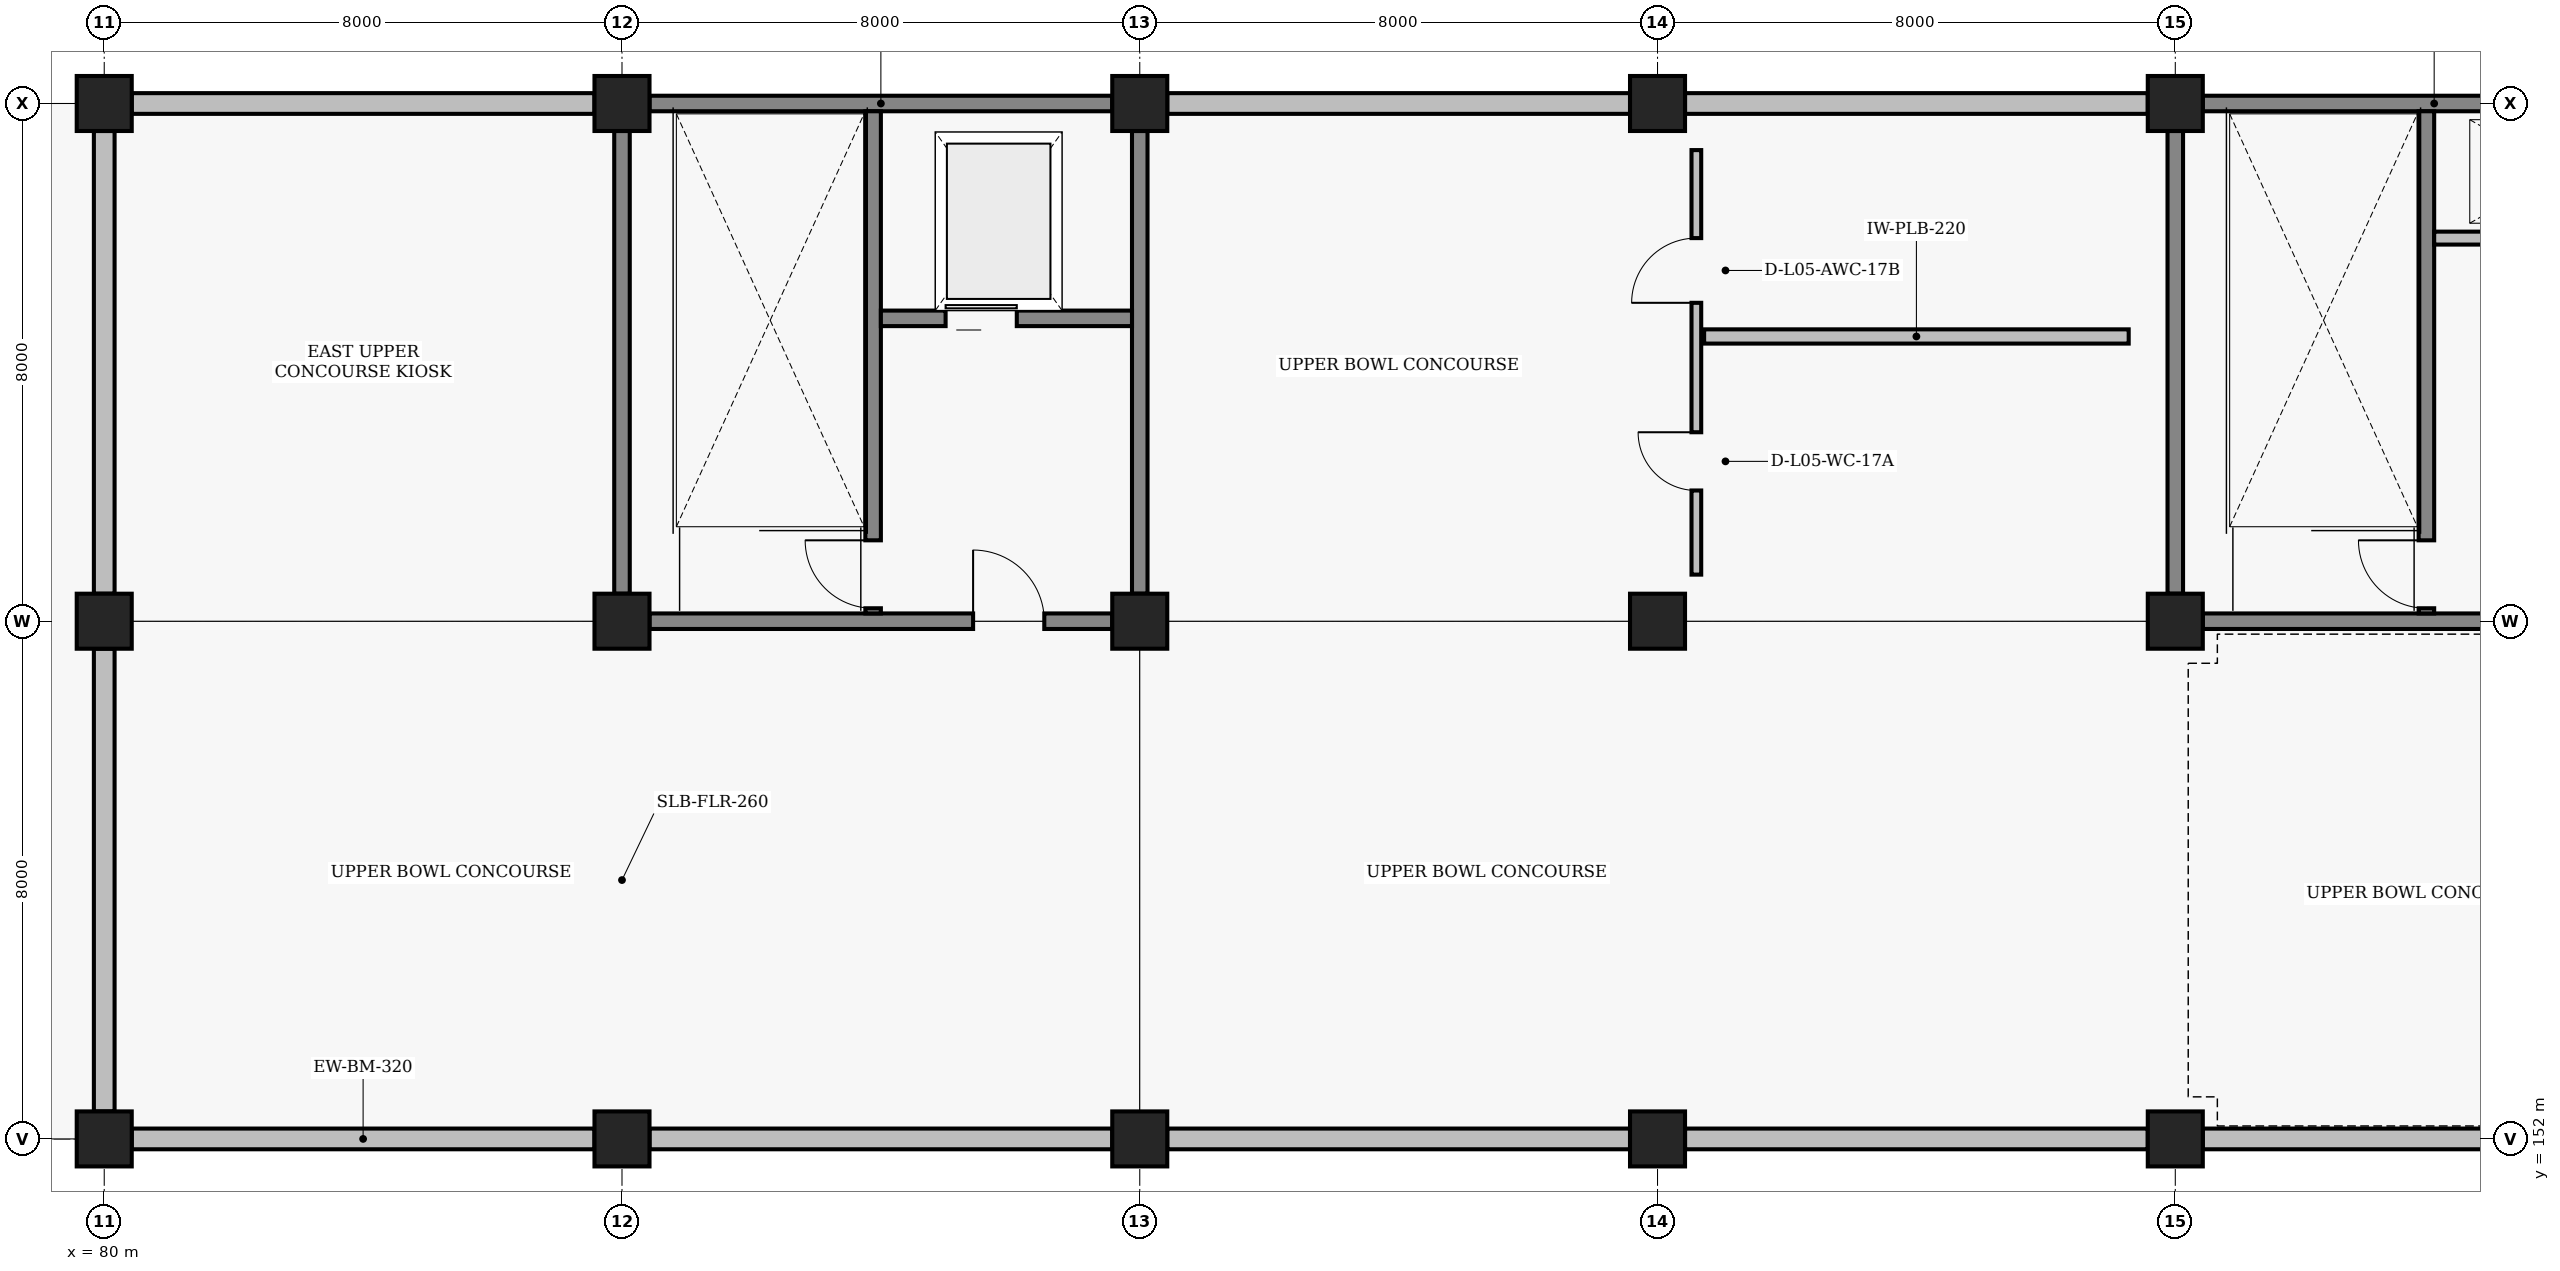
"""IFC4 building model, lengths in metres.
Left out: names, types, materials, properties, quantities, classifications, styles, units other than length and angle.
Written with IfcOpenShell. Run it as: python <this file> out.ifc"""

import sys

from ifc_helpers import new_model, si_unit, direction, frame, frame_2d, origin, origin_2d, place, context, subcontext, project, spatial, rectangle, extrude, element, fill, save


model = new_model("IFC4")
c1 = context("Model", 3, precision=1e-05, world=origin(), true_north=direction((0.0, 1.0)))
c2 = subcontext(c1, "Body", "Model", "MODEL_VIEW")
j1 = project(units=[si_unit("LENGTHUNIT", "METRE"), si_unit("PLANEANGLEUNIT", "RADIAN")], contexts=[c1])
p1 = place(None, origin())
s1 = spatial("IfcSite", under=j1, at=p1, CompositionType="ELEMENT")
p2 = place(p1, origin())
s2 = spatial("IfcBuilding", under=s1, at=p2, CompositionType="ELEMENT")
p3 = place(p2, frame((0.0, 0.0, 18.6)))
s3 = spatial("IfcBuildingStorey", under=s2, at=p3, CompositionType="ELEMENT", Elevation=18.6)
for number, where, z_axis, x_axis in (
    (1, (80.0, 152.0, 0.0), (0.0, 0.0, 1.0), (1.0, 0.0, 0.0)),
    (2, (80.0, 160.0, 0.0), (0.0, 0.0, 1.0), (1.0, 0.0, 0.0)),
    (3, (80.0, 168.0, 0.0), (0.0, 0.0, 1.0), (1.0, 0.0, 0.0)),
    (4, (88.0, 152.0, 0.0), (0.0, 0.0, 1.0), (1.0, 0.0, 0.0)),
    (5, (88.0, 160.0, 0.0), (0.0, 0.0, 1.0), (1.0, 0.0, 0.0)),
    (6, (88.0, 168.0, 0.0), (0.0, 0.0, 1.0), (1.0, 0.0, 0.0)),
    (7, (96.0, 152.0, 0.0), (0.0, 0.0, 1.0), (1.0, 0.0, 0.0)),
    (8, (96.0, 160.0, 0.0), (0.0, 0.0, 1.0), (1.0, 0.0, 0.0)),
    (9, (96.0, 168.0, 0.0), (0.0, 0.0, 1.0), (1.0, 0.0, 0.0)),
    (10, (104.0, 152.0, 0.0), (0.0, 0.0, 1.0), (1.0, 0.0, 0.0)),
    (11, (104.0, 160.0, 0.0), (0.0, 0.0, 1.0), (1.0, 0.0, 0.0)),
    (12, (104.0, 168.0, 0.0), (0.0, 0.0, 1.0), (1.0, 0.0, 0.0)),
    (13, (112.0, 152.0, 0.0), (0.0, 0.0, 1.0), (1.0, 0.0, 0.0)),
    (14, (112.0, 160.0, 0.0), (0.0, 0.0, 1.0), (1.0, 0.0, 0.0)),
    (15, (112.0, 168.0, 0.0), (0.0, 0.0, 1.0), (1.0, 0.0, 0.0)),
):
    element("IfcColumn", number, at=place(p3, frame(where, z_axis=z_axis, x_axis=x_axis)), inside=s3, PredefinedType="COLUMN", context=c2, shape_type="SweptSolid", body=[
        extrude(rectangle(XDim=0.85, YDim=0.85, at=origin_2d()), origin(), (0.0, 0.0, 1.0), 4.2),
    ])
for number, where, z_axis, x_axis in (
    (16, (80.425, 152.0, 0.0), (0.0, 0.0, 1.0), (1.0, 0.0, 0.0)),
    (17, (80.0, 152.425, 0.0), (0.0, 0.0, 1.0), (0.0, 1.0, 0.0)),
    (18, (80.425, 168.0, 0.0), (0.0, 0.0, 1.0), (1.0, 0.0, 0.0)),
    (19, (80.0, 160.425, 0.0), (0.0, 0.0, 1.0), (0.0, 1.0, 0.0)),
    (20, (88.425, 152.0, 0.0), (0.0, 0.0, 1.0), (1.0, 0.0, 0.0)),
    (21, (96.425, 152.0, 0.0), (0.0, 0.0, 1.0), (1.0, 0.0, 0.0)),
    (22, (96.425, 168.0, 0.0), (0.0, 0.0, 1.0), (1.0, 0.0, 0.0)),
    (23, (104.425, 152.0, 0.0), (0.0, 0.0, 1.0), (1.0, 0.0, 0.0)),
    (24, (104.425, 168.0, 0.0), (0.0, 0.0, 1.0), (1.0, 0.0, 0.0)),
    (25, (112.425, 152.0, 0.0), (0.0, 0.0, 1.0), (1.0, 0.0, 0.0)),
):
    element("IfcWall", number, at=place(p3, frame(where, z_axis=z_axis, x_axis=x_axis)), inside=s3, PredefinedType="SOLIDWALL", context=c2, shape_type="SweptSolid", body=[
        extrude(rectangle(XDim=7.15, YDim=0.32, at=frame_2d((3.575, 0.0))), origin(), (0.0, 0.0, 1.0), 3.35),
    ])
p4 = place(p3, frame((88.425, 160.0, 0.0), z_axis=(0.0, 0.0, 1.0), x_axis=(1.0, 0.0, 0.0)))
e26 = element("IfcWall", 26, at=p4, inside=s3, PredefinedType="SHEAR", context=c2, shape_type="SweptSolid", body=[
    extrude(rectangle(XDim=7.15, YDim=0.24, at=frame_2d((3.575, 0.0))), origin(), (0.0, 0.0, 1.0), 3.37),
])
p5 = place(p4, frame((5.0, 0.0, 0.0)))
e27 = element("IfcOpeningElement", 27, at=p5, cuts=e26, PredefinedType="OPENING", context=c2, shape_type="SweptSolid", body=[
    extrude(rectangle(XDim=1.1, YDim=2.2, at=frame_2d((0.55, 1.1))), frame((0.0, 0.13, 0.0), z_axis=(0.0, -1.0, 0.0), x_axis=(1.0, 0.0, 0.0)), (0.0, 0.0, 1.0), 0.26),
])
for number, where, z_axis, x_axis in (
    (28, (88.425, 168.0, 0.0), (0.0, 0.0, 1.0), (1.0, 0.0, 0.0)),
    (29, (88.0, 160.425, 0.0), (0.0, 0.0, 1.0), (0.0, 1.0, 0.0)),
    (30, (96.0, 160.425, 0.0), (0.0, 0.0, 1.0), (0.0, 1.0, 0.0)),
):
    element("IfcWall", number, at=place(p3, frame(where, z_axis=z_axis, x_axis=x_axis)), inside=s3, PredefinedType="SHEAR", context=c2, shape_type="SweptSolid", body=[
        extrude(rectangle(XDim=7.15, YDim=0.24, at=frame_2d((3.575, 0.0))), origin(), (0.0, 0.0, 1.0), 3.37),
    ])
p6 = place(p3, frame((91.88, 160.12, 0.0), z_axis=(0.0, 0.0, 1.0), x_axis=(0.0, 1.0, 0.0)))
e31 = element("IfcWall", 31, at=p6, inside=s3, PredefinedType="SHEAR", context=c2, shape_type="SweptSolid", body=[
    extrude(rectangle(XDim=7.76, YDim=0.24, at=frame_2d((3.88, 0.0))), origin(), (0.0, 0.0, 1.0), 3.47),
])
p7 = place(p6, frame((0.08, 0.0, 0.0)))
e32 = element("IfcOpeningElement", 32, at=p7, cuts=e31, PredefinedType="OPENING", context=c2, shape_type="SweptSolid", body=[
    extrude(rectangle(XDim=1.05, YDim=2.15, at=frame_2d((0.525, 1.075))), frame((0.0, 0.13, 0.0), z_axis=(0.0, -1.0, 0.0), x_axis=(1.0, 0.0, 0.0)), (0.0, 0.0, 1.0), 0.26),
])
p8 = place(p3, frame((92.0, 164.68, 0.0), z_axis=(0.0, 0.0, 1.0), x_axis=(1.0, 0.0, 0.0)))
e33 = element("IfcWall", 33, at=p8, inside=s3, PredefinedType="SHEAR", context=c2, shape_type="SweptSolid", body=[
    extrude(rectangle(XDim=3.88, YDim=0.24, at=frame_2d((1.94, 0.0))), origin(), (0.0, 0.0, 1.0), 3.37),
])
p9 = place(p8, frame((1.0, 0.0, 0.0)))
e34 = element("IfcOpeningElement", 34, at=p9, cuts=e33, PredefinedType="OPENING", context=c2, shape_type="SweptSolid", body=[
    extrude(rectangle(XDim=1.1, YDim=2.15, at=frame_2d((0.55, 1.075))), frame((0.0, 0.13, 0.0), z_axis=(0.0, -1.0, 0.0), x_axis=(1.0, 0.0, 0.0)), (0.0, 0.0, 1.0), 0.26),
])
p10 = place(p3, frame((112.425, 160.0, 0.0), z_axis=(0.0, 0.0, 1.0), x_axis=(1.0, 0.0, 0.0)))
e35 = element("IfcWall", 35, at=p10, inside=s3, PredefinedType="SHEAR", context=c2, shape_type="SweptSolid", body=[
    extrude(rectangle(XDim=7.15, YDim=0.24, at=frame_2d((3.575, 0.0))), origin(), (0.0, 0.0, 1.0), 3.37),
])
p11 = place(p10, frame((5.0, 0.0, 0.0)))
e36 = element("IfcOpeningElement", 36, at=p11, cuts=e35, PredefinedType="OPENING", context=c2, shape_type="SweptSolid", body=[
    extrude(rectangle(XDim=1.1, YDim=2.2, at=frame_2d((0.55, 1.1))), frame((0.0, 0.13, 0.0), z_axis=(0.0, -1.0, 0.0), x_axis=(1.0, 0.0, 0.0)), (0.0, 0.0, 1.0), 0.26),
])
for number, where, z_axis, x_axis in (
    (37, (112.425, 168.0, 0.0), (0.0, 0.0, 1.0), (1.0, 0.0, 0.0)),
    (38, (112.0, 160.425, 0.0), (0.0, 0.0, 1.0), (0.0, 1.0, 0.0)),
):
    element("IfcWall", number, at=place(p3, frame(where, z_axis=z_axis, x_axis=x_axis)), inside=s3, PredefinedType="SHEAR", context=c2, shape_type="SweptSolid", body=[
        extrude(rectangle(XDim=7.15, YDim=0.24, at=frame_2d((3.575, 0.0))), origin(), (0.0, 0.0, 1.0), 3.37),
    ])
p12 = place(p3, frame((115.88, 160.12, 0.0), z_axis=(0.0, 0.0, 1.0), x_axis=(0.0, 1.0, 0.0)))
e39 = element("IfcWall", 39, at=p12, inside=s3, PredefinedType="SHEAR", context=c2, shape_type="SweptSolid", body=[
    extrude(rectangle(XDim=7.76, YDim=0.24, at=frame_2d((3.88, 0.0))), origin(), (0.0, 0.0, 1.0), 3.47),
])
p13 = place(p12, frame((0.08, 0.0, 0.0)))
e40 = element("IfcOpeningElement", 40, at=p13, cuts=e39, PredefinedType="OPENING", context=c2, shape_type="SweptSolid", body=[
    extrude(rectangle(XDim=1.05, YDim=2.15, at=frame_2d((0.525, 1.075))), frame((0.0, 0.13, 0.0), z_axis=(0.0, -1.0, 0.0), x_axis=(1.0, 0.0, 0.0)), (0.0, 0.0, 1.0), 0.26),
])
p14 = place(p3, frame((116.0, 165.92, 0.0), z_axis=(0.0, 0.0, 1.0), x_axis=(1.0, 0.0, 0.0)))
e41 = element("IfcWall", 41, at=p14, inside=s3, PredefinedType="PARTITIONING", context=c2, shape_type="SweptSolid", body=[
    extrude(rectangle(XDim=3.88, YDim=0.2, at=frame_2d((1.94, 0.0))), origin(), (0.0, 0.0, 1.0), 3.37),
])
p15 = place(p14, frame((1.25, 0.0, 0.0)))
e42 = element("IfcOpeningElement", 42, at=p15, cuts=e41, PredefinedType="OPENING", context=c2, shape_type="SweptSolid", body=[
    extrude(rectangle(XDim=0.85, YDim=2.05, at=frame_2d((0.425, 1.025))), frame((0.0, 0.11, 0.0), z_axis=(0.0, -1.0, 0.0), x_axis=(1.0, 0.0, 0.0)), (0.0, 0.0, 1.0), 0.22),
])
p16 = place(p3, frame((104.72, 164.4, 0.0), z_axis=(0.0, 0.0, 1.0), x_axis=(1.0, 0.0, 0.0)))
e43 = element("IfcWall", 43, at=p16, inside=s3, PredefinedType="PLUMBINGWALL", context=c2, shape_type="SweptSolid", body=[
    extrude(rectangle(XDim=6.56, YDim=0.22, at=frame_2d((3.28, 0.0))), origin(), (0.0, 0.0, 1.0), 3.67),
])
p17 = place(p3, frame((104.6, 160.72, 0.0), z_axis=(0.0, 0.0, 1.0), x_axis=(0.0, 1.0, 0.0)))
e44 = element("IfcWall", 44, at=p17, inside=s3, PredefinedType="PARTITIONING", context=c2, shape_type="SweptSolid", body=[
    extrude(rectangle(XDim=6.56, YDim=0.15, at=frame_2d((3.28, 0.0))), origin(), (0.0, 0.0, 1.0), 3.67),
])
p18 = place(p17, frame((1.3, 0.0, 0.0)))
e45 = element("IfcOpeningElement", 45, at=p18, cuts=e44, PredefinedType="OPENING", context=c2, shape_type="SweptSolid", body=[
    extrude(rectangle(XDim=0.9, YDim=2.1, at=frame_2d((0.45, 1.05))), frame((0.0, 0.085, 0.0), z_axis=(0.0, -1.0, 0.0), x_axis=(1.0, 0.0, 0.0)), (0.0, 0.0, 1.0), 0.17),
])
p19 = place(p17, frame((4.2, 0.0, 0.0)))
e46 = element("IfcOpeningElement", 46, at=p19, cuts=e44, PredefinedType="OPENING", context=c2, shape_type="SweptSolid", body=[
    extrude(rectangle(XDim=1.0, YDim=2.15, at=frame_2d((0.5, 1.075))), frame((0.0, 0.085, 0.0), z_axis=(0.0, -1.0, 0.0), x_axis=(1.0, 0.0, 0.0)), (0.0, 0.0, 1.0), 0.17),
])
p20 = place(p5, origin())
e47 = element("IfcDoor", 47, at=p20, inside=s3, OperationType="SINGLE_SWING_LEFT", PredefinedType="DOOR", context=c2, shape_type="SweptSolid", body=[
    extrude(rectangle(XDim=1.1, YDim=2.2, at=frame_2d((0.55, 1.1))), frame((0.0, 0.025, 0.0), z_axis=(0.0, -1.0, 0.0), x_axis=(1.0, 0.0, 0.0)), (0.0, 0.0, 1.0), 0.05),
])
fill(e27, e47)
p21 = place(p7, origin())
e48 = element("IfcDoor", 48, at=p21, inside=s3, OperationType="SINGLE_SWING_RIGHT", PredefinedType="DOOR", context=c2, shape_type="SweptSolid", body=[
    extrude(rectangle(XDim=1.05, YDim=2.15, at=frame_2d((0.525, 1.075))), frame((0.0, 0.025, 0.0), z_axis=(0.0, -1.0, 0.0), x_axis=(1.0, 0.0, 0.0)), (0.0, 0.0, 1.0), 0.05),
])
fill(e32, e48)
p22 = place(p9, origin())
e49 = element("IfcDoor", 49, at=p22, inside=s3, OperationType="SLIDING_TO_LEFT", PredefinedType="DOOR", context=c2, shape_type="SweptSolid", body=[
    extrude(rectangle(XDim=1.1, YDim=2.15, at=frame_2d((0.55, 1.075))), frame((0.0, 0.025, 0.0), z_axis=(0.0, -1.0, 0.0), x_axis=(1.0, 0.0, 0.0)), (0.0, 0.0, 1.0), 0.05),
])
fill(e34, e49)
p23 = place(p13, origin())
e50 = element("IfcDoor", 50, at=p23, inside=s3, OperationType="SINGLE_SWING_RIGHT", PredefinedType="DOOR", context=c2, shape_type="SweptSolid", body=[
    extrude(rectangle(XDim=1.05, YDim=2.15, at=frame_2d((0.525, 1.075))), frame((0.0, 0.025, 0.0), z_axis=(0.0, -1.0, 0.0), x_axis=(1.0, 0.0, 0.0)), (0.0, 0.0, 1.0), 0.05),
])
fill(e40, e50)
p24 = place(p18, origin())
e51 = element("IfcDoor", 51, at=p24, inside=s3, OperationType="SINGLE_SWING_RIGHT", PredefinedType="DOOR", context=c2, shape_type="SweptSolid", body=[
    extrude(rectangle(XDim=0.9, YDim=2.1, at=frame_2d((0.45, 1.05))), frame((0.0, 0.025, 0.0), z_axis=(0.0, -1.0, 0.0), x_axis=(1.0, 0.0, 0.0)), (0.0, 0.0, 1.0), 0.05),
])
fill(e45, e51)
p25 = place(p19, origin())
e52 = element("IfcDoor", 52, at=p25, inside=s3, OperationType="SINGLE_SWING_LEFT", PredefinedType="DOOR", context=c2, shape_type="SweptSolid", body=[
    extrude(rectangle(XDim=1.0, YDim=2.15, at=frame_2d((0.5, 1.075))), frame((0.0, 0.025, 0.0), z_axis=(0.0, -1.0, 0.0), x_axis=(1.0, 0.0, 0.0)), (0.0, 0.0, 1.0), 0.05),
])
fill(e46, e52)
save(model, sys.argv[1])
